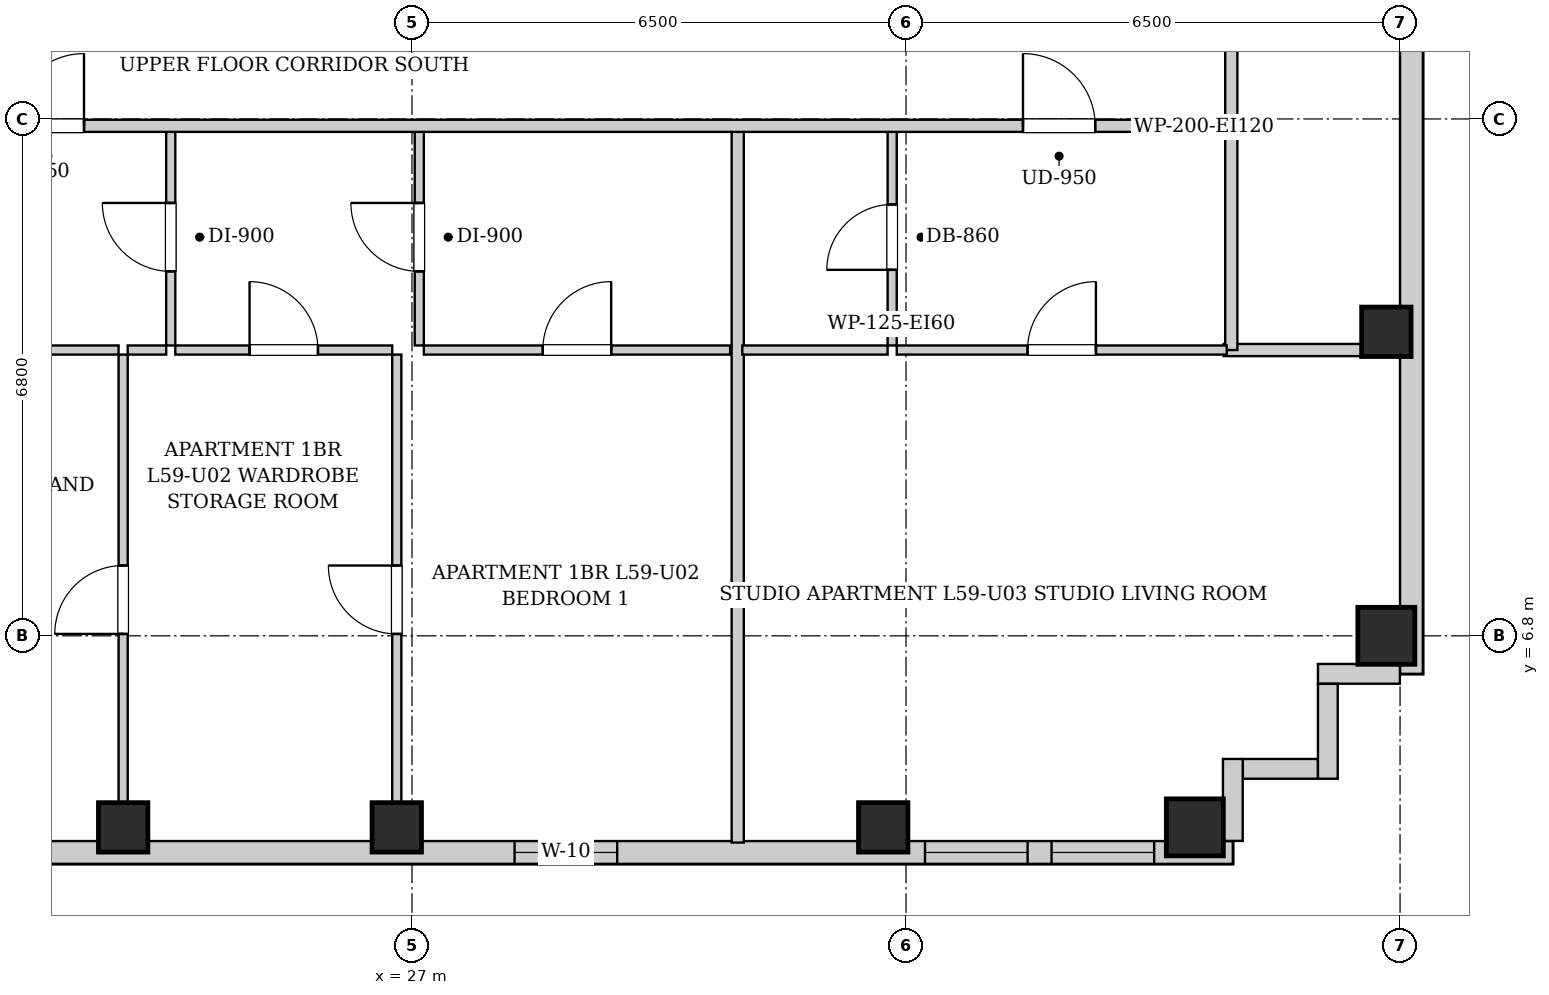
"""IFC4 building model, lengths in metres.
Left out: names, types, materials, properties, quantities, classifications, styles, units other than length and angle.
Written with IfcOpenShell. Run it as: python <this file> out.ifc"""

import sys

from ifc_helpers import new_model, si_unit, direction, frame, frame_2d, origin, origin_2d, place, context, subcontext, project, spatial, rectangle, extrude, element, fill, save


model = new_model("IFC4")
c1 = context("Model", 3, precision=1e-05, world=origin(), true_north=direction((0.0, 1.0)))
c2 = subcontext(c1, "Body", "Model", "MODEL_VIEW")
j1 = project(units=[si_unit("LENGTHUNIT", "METRE"), si_unit("PLANEANGLEUNIT", "RADIAN")], contexts=[c1])
p1 = place(None, origin())
s1 = spatial("IfcSite", under=j1, at=p1, CompositionType="ELEMENT")
p2 = place(p1, origin())
s2 = spatial("IfcBuilding", under=s1, at=p2, CompositionType="ELEMENT")
p3 = place(p2, frame((0.0, 0.0, 204.1)))
s3 = spatial("IfcBuildingStorey", under=s2, at=p3, CompositionType="ELEMENT", Elevation=204.1)
for number, where, z_axis, x_axis in (
    (1, (23.2, 4.28, 0.0), (0.0, 0.0, 1.0), (1.0, 0.0, 0.0)),
    (2, (26.8, 4.28, 0.0), (0.0, 0.0, 1.0), (1.0, 0.0, 0.0)),
    (3, (33.2, 4.28, 0.0), (0.0, 0.0, 1.0), (1.0, 0.0, 0.0)),
):
    element("IfcColumn", number, at=place(p3, frame(where, z_axis=z_axis, x_axis=x_axis)), inside=s3, PredefinedType="COLUMN", context=c2, shape_type="SweptSolid", body=[
        extrude(rectangle(XDim=0.65, YDim=0.65, at=origin_2d()), origin(), (0.0, 0.0, 1.0), 3.3),
    ])
for number, where, z_axis, x_axis in (
    (4, (37.3, 4.28, 0.0), (0.0, 0.0, 1.0), (1.0, 0.0, 0.0)),
    (5, (39.82, 6.8, 0.0), (0.0, 0.0, 1.0), (1.0, 0.0, 0.0)),
):
    element("IfcColumn", number, at=place(p3, frame(where, z_axis=z_axis, x_axis=x_axis)), inside=s3, PredefinedType="COLUMN", context=c2, shape_type="SweptSolid", body=[
        extrude(rectangle(XDim=0.75, YDim=0.75, at=origin_2d()), origin(), (0.0, 0.0, 1.0), 3.3),
    ])
p4 = place(p3, frame((39.82, 10.8, 0.0), z_axis=(0.0, 0.0, 1.0), x_axis=(1.0, 0.0, 0.0)))
e6 = element("IfcColumn", 6, at=p4, inside=s3, PredefinedType="COLUMN", context=c2, shape_type="SweptSolid", body=[
    extrude(rectangle(XDim=0.65, YDim=0.65, at=origin_2d()), origin(), (0.0, 0.0, 1.0), 3.3),
])
p5 = place(p3, frame((40.15, 37.7, 0.0), z_axis=(0.0, 0.0, 1.0), x_axis=(0.0, -1.0, 0.0)))
e7 = element("IfcWall", 7, at=p5, inside=s3, PredefinedType="SOLIDWALL", context=c2, shape_type="SweptSolid", body=[
    extrude(rectangle(XDim=31.4, YDim=0.3, at=frame_2d((15.7, 0.0))), origin(), (0.0, 0.0, 1.0), 3.04),
])
p6 = place(p5, frame((1.504, 0.0, 0.55)))
e8 = element("IfcOpeningElement", 8, at=p6, cuts=e7, PredefinedType="OPENING", context=c2, shape_type="SweptSolid", body=[
    extrude(rectangle(XDim=1.35, YDim=1.2, at=frame_2d((0.675, 0.6))), frame((0.0, 0.16, 0.0), z_axis=(0.0, -1.0, 0.0), x_axis=(1.0, 0.0, 0.0)), (0.0, 0.0, 1.0), 0.32),
])
p7 = place(p5, frame((19.683, 0.0, 0.55)))
e9 = element("IfcOpeningElement", 9, at=p7, cuts=e7, PredefinedType="OPENING", context=c2, shape_type="SweptSolid", body=[
    extrude(rectangle(XDim=1.35, YDim=1.2, at=frame_2d((0.675, 0.6))), frame((0.0, 0.16, 0.0), z_axis=(0.0, -1.0, 0.0), x_axis=(1.0, 0.0, 0.0)), (0.0, 0.0, 1.0), 0.32),
])
p8 = place(p5, frame((10.367, 0.0, 0.55)))
e10 = element("IfcOpeningElement", 10, at=p8, cuts=e7, PredefinedType="OPENING", context=c2, shape_type="SweptSolid", body=[
    extrude(rectangle(XDim=1.35, YDim=1.2, at=frame_2d((0.675, 0.6))), frame((0.0, 0.16, 0.0), z_axis=(0.0, -1.0, 0.0), x_axis=(1.0, 0.0, 0.0)), (0.0, 0.0, 1.0), 0.32),
])
p9 = place(p3, frame((37.8, 3.95, 0.0), z_axis=(0.0, 0.0, 1.0), x_axis=(-1.0, 0.0, 0.0)))
e11 = element("IfcWall", 11, at=p9, inside=s3, PredefinedType="SOLIDWALL", context=c2, shape_type="SweptSolid", body=[
    extrude(rectangle(XDim=18.15, YDim=0.3, at=frame_2d((9.075, 0.0))), origin(), (0.0, 0.0, 1.0), 3.04),
])
p10 = place(p9, frame((15.6, 0.0, 0.55)))
e12 = element("IfcOpeningElement", 12, at=p10, cuts=e11, PredefinedType="OPENING", context=c2, shape_type="SweptSolid", body=[
    extrude(rectangle(XDim=1.35, YDim=1.2, at=frame_2d((0.675, 0.6))), frame((0.0, 0.16, 0.0), z_axis=(0.0, -1.0, 0.0), x_axis=(1.0, 0.0, 0.0)), (0.0, 0.0, 1.0), 0.32),
])
p11 = place(p9, frame((8.1, 0.0, 0.55)))
e13 = element("IfcOpeningElement", 13, at=p11, cuts=e11, PredefinedType="OPENING", context=c2, shape_type="SweptSolid", body=[
    extrude(rectangle(XDim=1.35, YDim=1.2, at=frame_2d((0.675, 0.6))), frame((0.0, 0.16, 0.0), z_axis=(0.0, -1.0, 0.0), x_axis=(1.0, 0.0, 0.0)), (0.0, 0.0, 1.0), 0.32),
])
p12 = place(p9, frame((2.7, 0.0, 0.55)))
e14 = element("IfcOpeningElement", 14, at=p12, cuts=e11, PredefinedType="OPENING", context=c2, shape_type="SweptSolid", body=[
    extrude(rectangle(XDim=1.35, YDim=1.2, at=frame_2d((0.675, 0.6))), frame((0.0, 0.16, 0.0), z_axis=(0.0, -1.0, 0.0), x_axis=(1.0, 0.0, 0.0)), (0.0, 0.0, 1.0), 0.32),
])
p13 = place(p9, frame((1.035, 0.0, 0.55)))
e15 = element("IfcOpeningElement", 15, at=p13, cuts=e11, PredefinedType="OPENING", context=c2, shape_type="SweptSolid", body=[
    extrude(rectangle(XDim=1.35, YDim=1.2, at=frame_2d((0.675, 0.6))), frame((0.0, 0.16, 0.0), z_axis=(0.0, -1.0, 0.0), x_axis=(1.0, 0.0, 0.0)), (0.0, 0.0, 1.0), 0.32),
])
p14 = place(p3, frame((39.998, 6.3, 0.0), z_axis=(0.0, 0.0, 1.0), x_axis=(-1.0, 0.0, 0.0)))
e16 = element("IfcWall", 16, at=p14, inside=s3, PredefinedType="SOLIDWALL", context=c2, shape_type="SweptSolid", body=[
    extrude(rectangle(XDim=1.078, YDim=0.26, at=frame_2d((0.539, 0.0))), origin(), (0.0, 0.0, 1.0), 3.04),
])
p15 = place(p3, frame((39.05, 6.168, 0.0), z_axis=(0.0, 0.0, 1.0), x_axis=(0.0, -1.0, 0.0)))
e17 = element("IfcWall", 17, at=p15, inside=s3, PredefinedType="SOLIDWALL", context=c2, shape_type="SweptSolid", body=[
    extrude(rectangle(XDim=1.248, YDim=0.26, at=frame_2d((0.624, 0.0))), origin(), (0.0, 0.0, 1.0), 3.04),
])
p16 = place(p3, frame((38.918, 5.05, 0.0), z_axis=(0.0, 0.0, 1.0), x_axis=(-1.0, 0.0, 0.0)))
e18 = element("IfcWall", 18, at=p16, inside=s3, PredefinedType="SOLIDWALL", context=c2, shape_type="SweptSolid", body=[
    extrude(rectangle(XDim=0.986, YDim=0.26, at=frame_2d((0.493, 0.0))), origin(), (0.0, 0.0, 1.0), 3.04),
])
p17 = place(p3, frame((37.8, 5.18, 0.0), z_axis=(0.0, 0.0, 1.0), x_axis=(0.0, -1.0, 0.0)))
e19 = element("IfcWall", 19, at=p17, inside=s3, PredefinedType="SOLIDWALL", context=c2, shape_type="SweptSolid", body=[
    extrude(rectangle(XDim=1.078, YDim=0.26, at=frame_2d((0.539, 0.0))), origin(), (0.0, 0.0, 1.0), 3.04),
])
p18 = place(p3, frame((37.78, 13.51, 0.0), z_axis=(0.0, 0.0, 1.0), x_axis=(0.0, 1.0, 0.0)))
e20 = element("IfcWall", 20, at=p18, inside=s3, PredefinedType="PARTITIONING", context=c2, shape_type="SweptSolid", body=[
    extrude(rectangle(XDim=1.58, YDim=0.16, at=frame_2d((0.79, 0.0))), origin(), (0.0, 0.0, 1.0), 3.04),
])
p19 = place(p3, frame((23.826, 10.62, 0.0), z_axis=(0.0, 0.0, 1.0), x_axis=(0.0, 1.0, 0.0)))
e21 = element("IfcWall", 21, at=p19, inside=s3, PredefinedType="PARTITIONING", context=c2, shape_type="SweptSolid", body=[
    extrude(rectangle(XDim=2.85, YDim=0.12, at=frame_2d((1.425, 0.0))), origin(), (0.0, 0.0, 1.0), 3.04),
])
p20 = place(p19, frame((0.975, 0.0, 0.0)))
e22 = element("IfcOpeningElement", 22, at=p20, cuts=e21, PredefinedType="OPENING", context=c2, shape_type="SweptSolid", body=[
    extrude(rectangle(XDim=0.9, YDim=2.05, at=frame_2d((0.45, 1.025))), frame((0.0, 0.07, 0.0), z_axis=(0.0, -1.0, 0.0), x_axis=(1.0, 0.0, 0.0)), (0.0, 0.0, 1.0), 0.14),
])
p21 = place(p3, frame((19.326, 10.56, 0.0), z_axis=(0.0, 0.0, 1.0), x_axis=(1.0, 0.0, 0.0)))
e23 = element("IfcWall", 23, at=p21, inside=s3, PredefinedType="PARTITIONING", context=c2, shape_type="SweptSolid", body=[
    extrude(rectangle(XDim=3.814, YDim=0.12, at=frame_2d((1.907, 0.0))), origin(), (0.0, 0.0, 1.0), 3.04),
])
p22 = place(p21, frame((1.457, 0.0, 0.0)))
e24 = element("IfcOpeningElement", 24, at=p22, cuts=e23, PredefinedType="OPENING", context=c2, shape_type="SweptSolid", body=[
    extrude(rectangle(XDim=0.9, YDim=2.05, at=frame_2d((0.45, 1.025))), frame((0.0, 0.07, 0.0), z_axis=(0.0, -1.0, 0.0), x_axis=(1.0, 0.0, 0.0)), (0.0, 0.0, 1.0), 0.14),
])
p23 = place(p3, frame((23.26, 10.56, 0.0), z_axis=(0.0, 0.0, 1.0), x_axis=(1.0, 0.0, 0.0)))
e25 = element("IfcWall", 25, at=p23, inside=s3, PredefinedType="PARTITIONING", context=c2, shape_type="SweptSolid", body=[
    extrude(rectangle(XDim=0.506, YDim=0.12, at=frame_2d((0.253, 0.0))), origin(), (0.0, 0.0, 1.0), 3.04),
])
p24 = place(p3, frame((27.096, 10.62, 0.0), z_axis=(0.0, 0.0, 1.0), x_axis=(0.0, 1.0, 0.0)))
e26 = element("IfcWall", 26, at=p24, inside=s3, PredefinedType="PARTITIONING", context=c2, shape_type="SweptSolid", body=[
    extrude(rectangle(XDim=2.85, YDim=0.12, at=frame_2d((1.425, 0.0))), origin(), (0.0, 0.0, 1.0), 3.04),
])
p25 = place(p24, frame((0.975, 0.0, 0.0)))
e27 = element("IfcOpeningElement", 27, at=p25, cuts=e26, PredefinedType="OPENING", context=c2, shape_type="SweptSolid", body=[
    extrude(rectangle(XDim=0.9, YDim=2.05, at=frame_2d((0.45, 1.025))), frame((0.0, 0.07, 0.0), z_axis=(0.0, -1.0, 0.0), x_axis=(1.0, 0.0, 0.0)), (0.0, 0.0, 1.0), 0.14),
])
p26 = place(p3, frame((23.886, 10.56, 0.0), z_axis=(0.0, 0.0, 1.0), x_axis=(1.0, 0.0, 0.0)))
e28 = element("IfcWall", 28, at=p26, inside=s3, PredefinedType="PARTITIONING", context=c2, shape_type="SweptSolid", body=[
    extrude(rectangle(XDim=2.854, YDim=0.12, at=frame_2d((1.427, 0.0))), origin(), (0.0, 0.0, 1.0), 3.04),
])
p27 = place(p26, frame((0.977, 0.0, 0.0)))
e29 = element("IfcOpeningElement", 29, at=p27, cuts=e28, PredefinedType="OPENING", context=c2, shape_type="SweptSolid", body=[
    extrude(rectangle(XDim=0.9, YDim=2.05, at=frame_2d((0.45, 1.025))), frame((0.0, 0.07, 0.0), z_axis=(0.0, -1.0, 0.0), x_axis=(1.0, 0.0, 0.0)), (0.0, 0.0, 1.0), 0.14),
])
p28 = place(p3, frame((27.156, 10.56, 0.0), z_axis=(0.0, 0.0, 1.0), x_axis=(1.0, 0.0, 0.0)))
e30 = element("IfcWall", 30, at=p28, inside=s3, PredefinedType="PARTITIONING", context=c2, shape_type="SweptSolid", body=[
    extrude(rectangle(XDim=4.03, YDim=0.12, at=frame_2d((2.015, 0.0))), origin(), (0.0, 0.0, 1.0), 3.04),
])
p29 = place(p28, frame((1.565, 0.0, 0.0)))
e31 = element("IfcOpeningElement", 31, at=p29, cuts=e30, PredefinedType="OPENING", context=c2, shape_type="SweptSolid", body=[
    extrude(rectangle(XDim=0.9, YDim=2.05, at=frame_2d((0.45, 1.025))), frame((0.0, 0.07, 0.0), z_axis=(0.0, -1.0, 0.0), x_axis=(1.0, 0.0, 0.0)), (0.0, 0.0, 1.0), 0.14),
])
p30 = place(p3, frame((23.2, 4.08, 0.0), z_axis=(0.0, 0.0, 1.0), x_axis=(0.0, 1.0, 0.0)))
e32 = element("IfcWall", 32, at=p30, inside=s3, PredefinedType="PARTITIONING", context=c2, shape_type="SweptSolid", body=[
    extrude(rectangle(XDim=6.42, YDim=0.12, at=frame_2d((3.21, 0.0))), origin(), (0.0, 0.0, 1.0), 3.04),
])
p31 = place(p30, frame((2.745, 0.0, 0.0)))
e33 = element("IfcOpeningElement", 33, at=p31, cuts=e32, PredefinedType="OPENING", context=c2, shape_type="SweptSolid", body=[
    extrude(rectangle(XDim=0.9, YDim=2.05, at=frame_2d((0.45, 1.025))), frame((0.0, 0.07, 0.0), z_axis=(0.0, -1.0, 0.0), x_axis=(1.0, 0.0, 0.0)), (0.0, 0.0, 1.0), 0.14),
])
p32 = place(p3, frame((26.8, 4.08, 0.0), z_axis=(0.0, 0.0, 1.0), x_axis=(0.0, 1.0, 0.0)))
e34 = element("IfcWall", 34, at=p32, inside=s3, PredefinedType="PARTITIONING", context=c2, shape_type="SweptSolid", body=[
    extrude(rectangle(XDim=6.42, YDim=0.12, at=frame_2d((3.21, 0.0))), origin(), (0.0, 0.0, 1.0), 3.04),
])
p33 = place(p32, frame((2.745, 0.0, 0.0)))
e35 = element("IfcOpeningElement", 35, at=p33, cuts=e34, PredefinedType="OPENING", context=c2, shape_type="SweptSolid", body=[
    extrude(rectangle(XDim=0.9, YDim=2.05, at=frame_2d((0.45, 1.025))), frame((0.0, 0.07, 0.0), z_axis=(0.0, -1.0, 0.0), x_axis=(1.0, 0.0, 0.0)), (0.0, 0.0, 1.0), 0.14),
])
p34 = place(p3, frame((37.68, 10.56, 0.0), z_axis=(0.0, 0.0, 1.0), x_axis=(1.0, 0.0, 0.0)))
e36 = element("IfcWall", 36, at=p34, inside=s3, PredefinedType="PARTITIONING", context=c2, shape_type="SweptSolid", body=[
    extrude(rectangle(XDim=2.34, YDim=0.16, at=frame_2d((1.17, 0.0))), origin(), (0.0, 0.0, 1.0), 3.04),
])
p35 = place(p3, frame((37.78, 10.56, 0.0), z_axis=(0.0, 0.0, 1.0), x_axis=(0.0, 1.0, 0.0)))
e37 = element("IfcWall", 37, at=p35, inside=s3, PredefinedType="PARTITIONING", context=c2, shape_type="SweptSolid", body=[
    extrude(rectangle(XDim=2.91, YDim=0.16, at=frame_2d((1.455, 0.0))), origin(), (0.0, 0.0, 1.0), 3.04),
])
p36 = place(p3, frame((31.286, 4.08, 0.0), z_axis=(0.0, 0.0, 1.0), x_axis=(0.0, 1.0, 0.0)))
e38 = element("IfcWall", 38, at=p36, inside=s3, PredefinedType="PARTITIONING", context=c2, shape_type="SweptSolid", body=[
    extrude(rectangle(XDim=9.39, YDim=0.16, at=frame_2d((4.695, 0.0))), origin(), (0.0, 0.0, 1.0), 3.04),
])
p37 = place(p3, frame((33.318, 10.62, 0.0), z_axis=(0.0, 0.0, 1.0), x_axis=(0.0, 1.0, 0.0)))
e39 = element("IfcWall", 39, at=p37, inside=s3, PredefinedType="PARTITIONING", context=c2, shape_type="SweptSolid", body=[
    extrude(rectangle(XDim=2.85, YDim=0.12, at=frame_2d((1.425, 0.0))), origin(), (0.0, 0.0, 1.0), 3.04),
])
p38 = place(p37, frame((0.995, 0.0, 0.0)))
e40 = element("IfcOpeningElement", 40, at=p38, cuts=e39, PredefinedType="OPENING", context=c2, shape_type="SweptSolid", body=[
    extrude(rectangle(XDim=0.86, YDim=2.05, at=frame_2d((0.43, 1.025))), frame((0.0, 0.07, 0.0), z_axis=(0.0, -1.0, 0.0), x_axis=(1.0, 0.0, 0.0)), (0.0, 0.0, 1.0), 0.14),
])
p39 = place(p3, frame((31.346, 10.56, 0.0), z_axis=(0.0, 0.0, 1.0), x_axis=(1.0, 0.0, 0.0)))
e41 = element("IfcWall", 41, at=p39, inside=s3, PredefinedType="PARTITIONING", context=c2, shape_type="SweptSolid", body=[
    extrude(rectangle(XDim=1.912, YDim=0.12, at=frame_2d((0.956, 0.0))), origin(), (0.0, 0.0, 1.0), 3.04),
])
p40 = place(p3, frame((33.378, 10.56, 0.0), z_axis=(0.0, 0.0, 1.0), x_axis=(1.0, 0.0, 0.0)))
e42 = element("IfcWall", 42, at=p40, inside=s3, PredefinedType="PARTITIONING", context=c2, shape_type="SweptSolid", body=[
    extrude(rectangle(XDim=4.342, YDim=0.12, at=frame_2d((2.171, 0.0))), origin(), (0.0, 0.0, 1.0), 3.04),
])
p41 = place(p40, frame((1.721, 0.0, 0.0)))
e43 = element("IfcOpeningElement", 43, at=p41, cuts=e42, PredefinedType="OPENING", context=c2, shape_type="SweptSolid", body=[
    extrude(rectangle(XDim=0.9, YDim=2.05, at=frame_2d((0.45, 1.025))), frame((0.0, 0.07, 0.0), z_axis=(0.0, -1.0, 0.0), x_axis=(1.0, 0.0, 0.0)), (0.0, 0.0, 1.0), 0.14),
])
p42 = place(p3, frame((13.15, 13.51, 0.0), z_axis=(0.0, 0.0, 1.0), x_axis=(1.0, 0.0, 0.0)))
e44 = element("IfcWall", 44, at=p42, inside=s3, PredefinedType="PARTITIONING", context=c2, shape_type="SweptSolid", body=[
    extrude(rectangle(XDim=24.6, YDim=0.16, at=frame_2d((12.3, 0.0))), origin(), (0.0, 0.0, 1.0), 3.04),
])
p43 = place(p42, frame((1.323, 0.0, 0.0)))
e45 = element("IfcOpeningElement", 45, at=p43, cuts=e44, PredefinedType="OPENING", context=c2, shape_type="SweptSolid", body=[
    extrude(rectangle(XDim=0.95, YDim=2.1, at=frame_2d((0.475, 1.05))), frame((0.0, 0.09, 0.0), z_axis=(0.0, -1.0, 0.0), x_axis=(1.0, 0.0, 0.0)), (0.0, 0.0, 1.0), 0.18),
])
p44 = place(p42, frame((8.585, 0.0, 0.0)))
e46 = element("IfcOpeningElement", 46, at=p44, cuts=e44, PredefinedType="OPENING", context=c2, shape_type="SweptSolid", body=[
    extrude(rectangle(XDim=0.95, YDim=2.1, at=frame_2d((0.475, 1.05))), frame((0.0, 0.09, 0.0), z_axis=(0.0, -1.0, 0.0), x_axis=(1.0, 0.0, 0.0)), (0.0, 0.0, 1.0), 0.18),
])
p45 = place(p42, frame((21.889, 0.0, 0.0)))
e47 = element("IfcOpeningElement", 47, at=p45, cuts=e44, PredefinedType="OPENING", context=c2, shape_type="SweptSolid", body=[
    extrude(rectangle(XDim=0.95, YDim=2.1, at=frame_2d((0.475, 1.05))), frame((0.0, 0.09, 0.0), z_axis=(0.0, -1.0, 0.0), x_axis=(1.0, 0.0, 0.0)), (0.0, 0.0, 1.0), 0.18),
])
p46 = place(p20, origin())
e48 = element("IfcDoor", 48, at=p46, inside=s3, OperationType="SINGLE_SWING_RIGHT", PredefinedType="DOOR", context=c2, shape_type="SweptSolid", body=[
    extrude(rectangle(XDim=0.9, YDim=2.05, at=frame_2d((0.45, 1.025))), frame((0.0, 0.025, 0.0), z_axis=(0.0, -1.0, 0.0), x_axis=(1.0, 0.0, 0.0)), (0.0, 0.0, 1.0), 0.05),
])
fill(e22, e48)
p47 = place(p25, origin())
e49 = element("IfcDoor", 49, at=p47, inside=s3, OperationType="SINGLE_SWING_RIGHT", PredefinedType="DOOR", context=c2, shape_type="SweptSolid", body=[
    extrude(rectangle(XDim=0.9, YDim=2.05, at=frame_2d((0.45, 1.025))), frame((0.0, 0.025, 0.0), z_axis=(0.0, -1.0, 0.0), x_axis=(1.0, 0.0, 0.0)), (0.0, 0.0, 1.0), 0.05),
])
fill(e27, e49)
p48 = place(p27, origin())
e50 = element("IfcDoor", 50, at=p48, inside=s3, OperationType="SINGLE_SWING_LEFT", PredefinedType="DOOR", context=c2, shape_type="SweptSolid", body=[
    extrude(rectangle(XDim=0.9, YDim=2.05, at=frame_2d((0.45, 1.025))), frame((0.0, 0.025, 0.0), z_axis=(0.0, -1.0, 0.0), x_axis=(1.0, 0.0, 0.0)), (0.0, 0.0, 1.0), 0.05),
])
fill(e29, e50)
p49 = place(p29, origin())
e51 = element("IfcDoor", 51, at=p49, inside=s3, OperationType="SINGLE_SWING_RIGHT", PredefinedType="DOOR", context=c2, shape_type="SweptSolid", body=[
    extrude(rectangle(XDim=0.9, YDim=2.05, at=frame_2d((0.45, 1.025))), frame((0.0, 0.025, 0.0), z_axis=(0.0, -1.0, 0.0), x_axis=(1.0, 0.0, 0.0)), (0.0, 0.0, 1.0), 0.05),
])
fill(e31, e51)
p50 = place(p31, origin())
e52 = element("IfcDoor", 52, at=p50, inside=s3, OperationType="SINGLE_SWING_LEFT", PredefinedType="DOOR", context=c2, shape_type="SweptSolid", body=[
    extrude(rectangle(XDim=0.9, YDim=2.05, at=frame_2d((0.45, 1.025))), frame((0.0, 0.025, 0.0), z_axis=(0.0, -1.0, 0.0), x_axis=(1.0, 0.0, 0.0)), (0.0, 0.0, 1.0), 0.05),
])
fill(e33, e52)
p51 = place(p33, origin())
e53 = element("IfcDoor", 53, at=p51, inside=s3, OperationType="SINGLE_SWING_RIGHT", PredefinedType="DOOR", context=c2, shape_type="SweptSolid", body=[
    extrude(rectangle(XDim=0.9, YDim=2.05, at=frame_2d((0.45, 1.025))), frame((0.0, 0.025, 0.0), z_axis=(0.0, -1.0, 0.0), x_axis=(1.0, 0.0, 0.0)), (0.0, 0.0, 1.0), 0.05),
])
fill(e35, e53)
p52 = place(p38, origin())
e54 = element("IfcDoor", 54, at=p52, inside=s3, OperationType="SINGLE_SWING_LEFT", PredefinedType="DOOR", context=c2, shape_type="SweptSolid", body=[
    extrude(rectangle(XDim=0.86, YDim=2.05, at=frame_2d((0.43, 1.025))), frame((0.0, 0.025, 0.0), z_axis=(0.0, -1.0, 0.0), x_axis=(1.0, 0.0, 0.0)), (0.0, 0.0, 1.0), 0.05),
])
fill(e40, e54)
p53 = place(p41, origin())
e55 = element("IfcDoor", 55, at=p53, inside=s3, OperationType="SINGLE_SWING_RIGHT", PredefinedType="DOOR", context=c2, shape_type="SweptSolid", body=[
    extrude(rectangle(XDim=0.9, YDim=2.05, at=frame_2d((0.45, 1.025))), frame((0.0, 0.025, 0.0), z_axis=(0.0, -1.0, 0.0), x_axis=(1.0, 0.0, 0.0)), (0.0, 0.0, 1.0), 0.05),
])
fill(e43, e55)
p54 = place(p44, origin())
e56 = element("IfcDoor", 56, at=p54, inside=s3, OperationType="SINGLE_SWING_RIGHT", PredefinedType="DOOR", context=c2, shape_type="SweptSolid", body=[
    extrude(rectangle(XDim=0.95, YDim=2.1, at=frame_2d((0.475, 1.05))), frame((0.0, 0.025, 0.0), z_axis=(0.0, -1.0, 0.0), x_axis=(1.0, 0.0, 0.0)), (0.0, 0.0, 1.0), 0.05),
])
fill(e46, e56)
p55 = place(p45, origin())
e57 = element("IfcDoor", 57, at=p55, inside=s3, OperationType="SINGLE_SWING_LEFT", PredefinedType="DOOR", context=c2, shape_type="SweptSolid", body=[
    extrude(rectangle(XDim=0.95, YDim=2.1, at=frame_2d((0.475, 1.05))), frame((0.0, 0.025, 0.0), z_axis=(0.0, -1.0, 0.0), x_axis=(1.0, 0.0, 0.0)), (0.0, 0.0, 1.0), 0.05),
])
fill(e47, e57)
p56 = place(p11, origin())
e58 = element("IfcWindow", 58, at=p56, inside=s3, PartitioningType="SINGLE_PANEL", PredefinedType="WINDOW", context=c2, shape_type="SweptSolid", body=[
    extrude(rectangle(XDim=1.35, YDim=1.2, at=frame_2d((0.675, 0.6))), frame((0.0, 0.03, 0.0), z_axis=(0.0, -1.0, 0.0), x_axis=(1.0, 0.0, 0.0)), (0.0, 0.0, 1.0), 0.06),
])
fill(e13, e58)
p57 = place(p12, origin())
e59 = element("IfcWindow", 59, at=p57, inside=s3, PartitioningType="SINGLE_PANEL", PredefinedType="WINDOW", context=c2, shape_type="SweptSolid", body=[
    extrude(rectangle(XDim=1.35, YDim=1.2, at=frame_2d((0.675, 0.6))), frame((0.0, 0.03, 0.0), z_axis=(0.0, -1.0, 0.0), x_axis=(1.0, 0.0, 0.0)), (0.0, 0.0, 1.0), 0.06),
])
fill(e14, e59)
p58 = place(p13, origin())
e60 = element("IfcWindow", 60, at=p58, inside=s3, PartitioningType="SINGLE_PANEL", PredefinedType="WINDOW", context=c2, shape_type="SweptSolid", body=[
    extrude(rectangle(XDim=1.35, YDim=1.2, at=frame_2d((0.675, 0.6))), frame((0.0, 0.03, 0.0), z_axis=(0.0, -1.0, 0.0), x_axis=(1.0, 0.0, 0.0)), (0.0, 0.0, 1.0), 0.06),
])
fill(e15, e60)
save(model, sys.argv[1])
